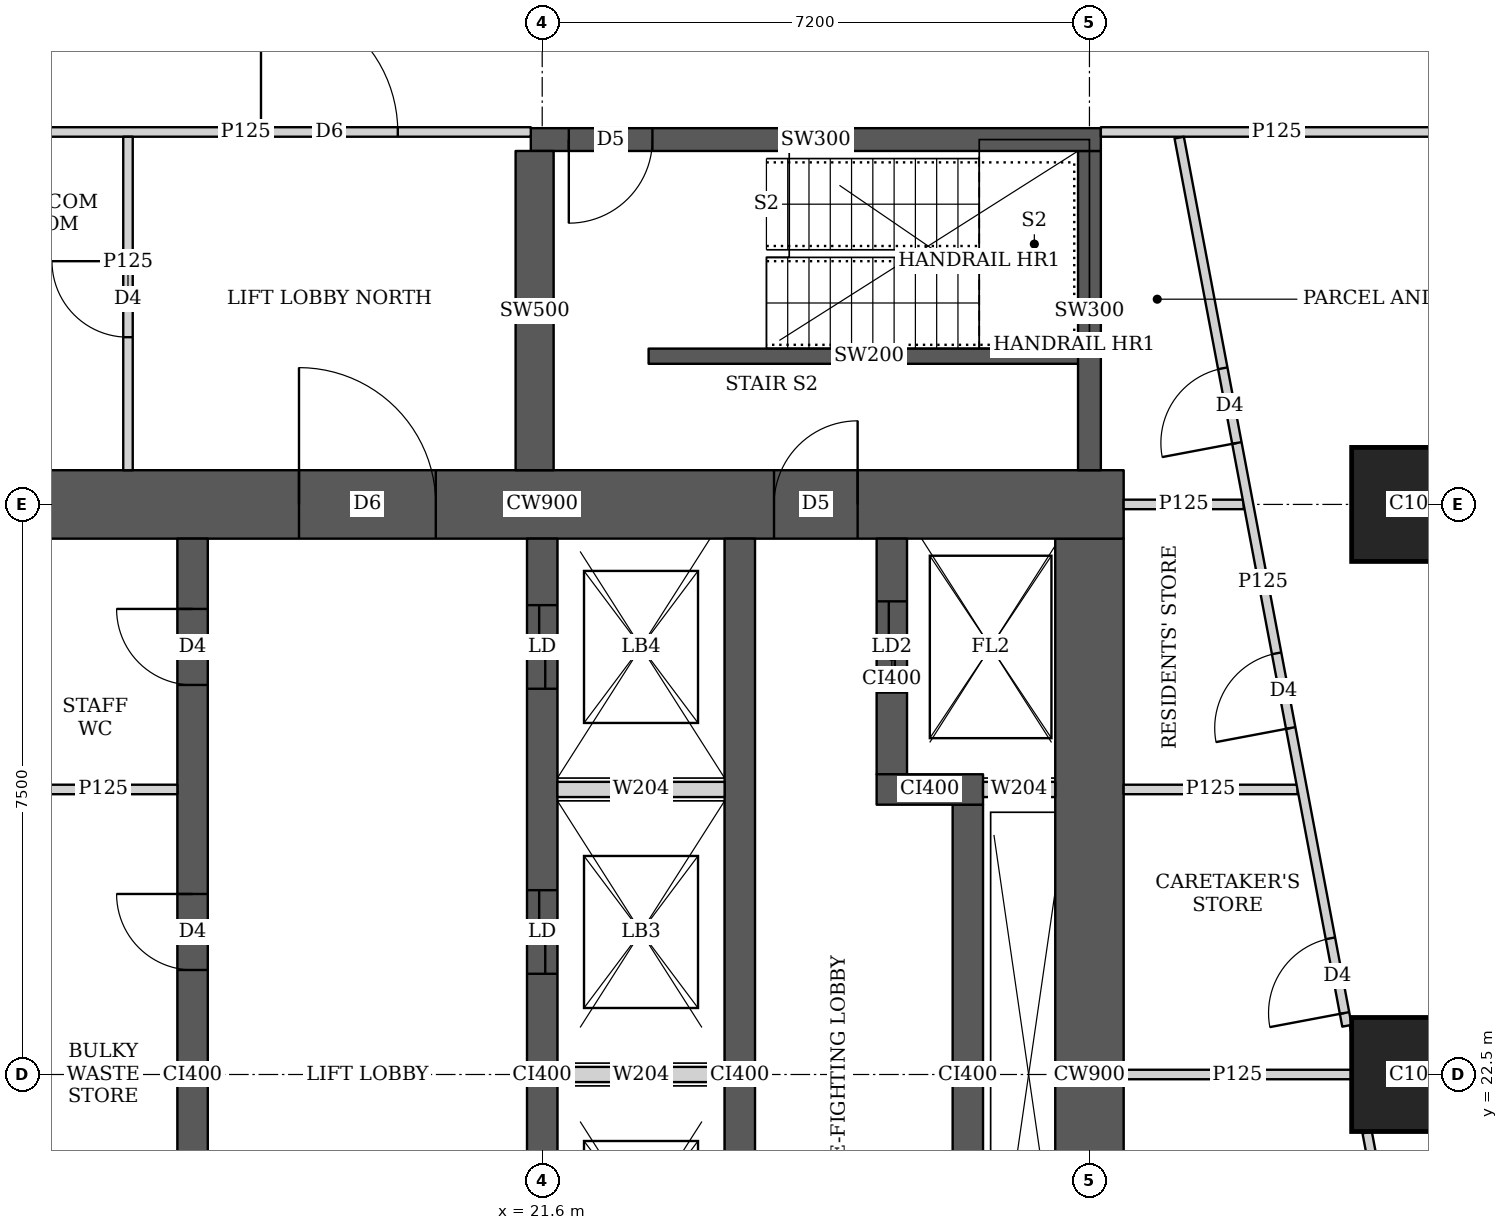
"""IFC4 building model, lengths in metres.
Left out: names, types, materials, properties, quantities, classifications, styles, units other than length and angle.
Written with IfcOpenShell. Run it as: python <this file> out.ifc"""

import sys

from ifc_helpers import new_model, si_unit, direction, frame, frame_2d, origin, origin_2d, place, context, subcontext, project, spatial, rectangle, extrude, element, fill, save


model = new_model("IFC4")
c1 = context("Model", 3, precision=1e-05, world=origin(), true_north=direction((0.0, 1.0)))
c2 = subcontext(c1, "Body", "Model", "MODEL_VIEW")
j1 = project(units=[si_unit("LENGTHUNIT", "METRE"), si_unit("PLANEANGLEUNIT", "RADIAN")], contexts=[c1])
p1 = place(None, origin())
s1 = spatial("IfcSite", under=j1, at=p1, CompositionType="ELEMENT")
p2 = place(p1, origin())
s2 = spatial("IfcBuilding", under=s1, at=p2, CompositionType="ELEMENT")
p3 = place(p2, frame((0.0, 0.0, 147.05)))
s3 = spatial("IfcBuildingStorey", under=s2, at=p3, CompositionType="ELEMENT", Elevation=147.05)
for number, where, z_axis, x_axis in (
    (1, (33.0, 22.5, 0.0), (0.0, 0.0, 1.0), (1.0, 0.0, 0.0)),
    (2, (33.0, 30.0, 0.0), (0.0, 0.0, 1.0), (1.0, 0.0, 0.0)),
):
    element("IfcColumn", number, at=place(p3, frame(where, z_axis=z_axis, x_axis=x_axis)), inside=s3, PredefinedType="COLUMN", context=c2, shape_type="SweptSolid", body=[
        extrude(rectangle(XDim=1.5, YDim=1.5, at=origin_2d()), origin(), (0.0, 0.0, 1.0), 3.75),
    ])
p4 = place(p3, frame((13.95, 30.0, 0.0), z_axis=(0.0, 0.0, 1.0), x_axis=(1.0, 0.0, 0.0)))
e3 = element("IfcWall", 3, at=p4, inside=s3, PredefinedType="SHEAR", context=c2, shape_type="SweptSolid", body=[
    extrude(rectangle(XDim=15.3, YDim=0.9, at=frame_2d((7.65, 0.0))), origin(), (0.0, 0.0, 1.0), 3.75),
])
p5 = place(p4, frame((4.45, 0.0, 0.0)))
e4 = element("IfcOpeningElement", 4, at=p5, cuts=e3, PredefinedType="OPENING", context=c2, shape_type="SweptSolid", body=[
    extrude(rectangle(XDim=1.8, YDim=2.1, at=frame_2d((0.9, 1.05))), frame((0.0, 0.46, 0.0), z_axis=(0.0, -1.0, 0.0), x_axis=(1.0, 0.0, 0.0)), (0.0, 0.0, 1.0), 0.92),
])
p6 = place(p4, frame((10.7, 0.0, 0.0)))
e5 = element("IfcOpeningElement", 5, at=p6, cuts=e3, PredefinedType="OPENING", context=c2, shape_type="SweptSolid", body=[
    extrude(rectangle(XDim=1.1, YDim=2.1, at=frame_2d((0.55, 1.05))), frame((0.0, 0.46, 0.0), z_axis=(0.0, -1.0, 0.0), x_axis=(1.0, 0.0, 0.0)), (0.0, 0.0, 1.0), 0.92),
])
p7 = place(p3, frame((28.8, 15.45, 0.0), z_axis=(0.0, 0.0, 1.0), x_axis=(0.0, 1.0, 0.0)))
e6 = element("IfcWall", 6, at=p7, inside=s3, PredefinedType="SHEAR", context=c2, shape_type="SweptSolid", body=[
    extrude(rectangle(XDim=14.1, YDim=0.9, at=frame_2d((7.05, 0.0))), origin(), (0.0, 0.0, 1.0), 3.75),
])
p8 = place(p3, frame((17.0, 15.45, 0.0), z_axis=(0.0, 0.0, 1.0), x_axis=(0.0, 1.0, 0.0)))
e7 = element("IfcWall", 7, at=p8, inside=s3, PredefinedType="SHEAR", context=c2, shape_type="SweptSolid", body=[
    extrude(rectangle(XDim=14.1, YDim=0.4, at=frame_2d((7.05, 0.0))), origin(), (0.0, 0.0, 1.0), 3.75),
])
p9 = place(p8, frame((0.925, 0.0, 0.0)))
e8 = element("IfcOpeningElement", 8, at=p9, cuts=e7, PredefinedType="OPENING", context=c2, shape_type="SweptSolid", body=[
    extrude(rectangle(XDim=1.0, YDim=2.1, at=frame_2d((0.5, 1.05))), frame((0.0, 0.21, 0.0), z_axis=(0.0, -1.0, 0.0), x_axis=(1.0, 0.0, 0.0)), (0.0, 0.0, 1.0), 0.42),
])
p10 = place(p8, frame((4.675, 0.0, 0.0)))
e9 = element("IfcOpeningElement", 9, at=p10, cuts=e7, PredefinedType="OPENING", context=c2, shape_type="SweptSolid", body=[
    extrude(rectangle(XDim=1.0, YDim=2.1, at=frame_2d((0.5, 1.05))), frame((0.0, 0.21, 0.0), z_axis=(0.0, -1.0, 0.0), x_axis=(1.0, 0.0, 0.0)), (0.0, 0.0, 1.0), 0.42),
])
p11 = place(p8, frame((8.425, 0.0, 0.0)))
e10 = element("IfcOpeningElement", 10, at=p11, cuts=e7, PredefinedType="OPENING", context=c2, shape_type="SweptSolid", body=[
    extrude(rectangle(XDim=1.0, YDim=2.1, at=frame_2d((0.5, 1.05))), frame((0.0, 0.21, 0.0), z_axis=(0.0, -1.0, 0.0), x_axis=(1.0, 0.0, 0.0)), (0.0, 0.0, 1.0), 0.42),
])
p12 = place(p8, frame((12.175, 0.0, 0.0)))
e11 = element("IfcOpeningElement", 11, at=p12, cuts=e7, PredefinedType="OPENING", context=c2, shape_type="SweptSolid", body=[
    extrude(rectangle(XDim=1.0, YDim=2.1, at=frame_2d((0.5, 1.05))), frame((0.0, 0.21, 0.0), z_axis=(0.0, -1.0, 0.0), x_axis=(1.0, 0.0, 0.0)), (0.0, 0.0, 1.0), 0.42),
])
p13 = place(p3, frame((21.6, 15.45, 0.0), z_axis=(0.0, 0.0, 1.0), x_axis=(0.0, 1.0, 0.0)))
e12 = element("IfcWall", 12, at=p13, inside=s3, PredefinedType="SHEAR", context=c2, shape_type="SweptSolid", body=[
    extrude(rectangle(XDim=14.1, YDim=0.4, at=frame_2d((7.05, 0.0))), origin(), (0.0, 0.0, 1.0), 3.75),
])
p14 = place(p13, frame((0.875, 0.0, 0.0)))
e13 = element("IfcOpeningElement", 13, at=p14, cuts=e12, PredefinedType="OPENING", context=c2, shape_type="SweptSolid", body=[
    extrude(rectangle(XDim=1.1, YDim=2.1, at=frame_2d((0.55, 1.05))), frame((0.0, 0.21, 0.0), z_axis=(0.0, -1.0, 0.0), x_axis=(1.0, 0.0, 0.0)), (0.0, 0.0, 1.0), 0.42),
])
p15 = place(p13, frame((4.625, 0.0, 0.0)))
e14 = element("IfcOpeningElement", 14, at=p15, cuts=e12, PredefinedType="OPENING", context=c2, shape_type="SweptSolid", body=[
    extrude(rectangle(XDim=1.1, YDim=2.1, at=frame_2d((0.55, 1.05))), frame((0.0, 0.21, 0.0), z_axis=(0.0, -1.0, 0.0), x_axis=(1.0, 0.0, 0.0)), (0.0, 0.0, 1.0), 0.42),
])
p16 = place(p13, frame((8.375, 0.0, 0.0)))
e15 = element("IfcOpeningElement", 15, at=p16, cuts=e12, PredefinedType="OPENING", context=c2, shape_type="SweptSolid", body=[
    extrude(rectangle(XDim=1.1, YDim=2.1, at=frame_2d((0.55, 1.05))), frame((0.0, 0.21, 0.0), z_axis=(0.0, -1.0, 0.0), x_axis=(1.0, 0.0, 0.0)), (0.0, 0.0, 1.0), 0.42),
])
p17 = place(p13, frame((12.125, 0.0, 0.0)))
e16 = element("IfcOpeningElement", 16, at=p17, cuts=e12, PredefinedType="OPENING", context=c2, shape_type="SweptSolid", body=[
    extrude(rectangle(XDim=1.1, YDim=2.1, at=frame_2d((0.55, 1.05))), frame((0.0, 0.21, 0.0), z_axis=(0.0, -1.0, 0.0), x_axis=(1.0, 0.0, 0.0)), (0.0, 0.0, 1.0), 0.42),
])
p18 = place(p3, frame((24.2, 15.45, 0.0), z_axis=(0.0, 0.0, 1.0), x_axis=(0.0, 1.0, 0.0)))
e17 = element("IfcWall", 17, at=p18, inside=s3, PredefinedType="SHEAR", context=c2, shape_type="SweptSolid", body=[
    extrude(rectangle(XDim=14.1, YDim=0.4, at=frame_2d((7.05, 0.0))), origin(), (0.0, 0.0, 1.0), 3.75),
])
p19 = place(p3, frame((27.2, 18.95, 0.0), z_axis=(0.0, 0.0, 1.0), x_axis=(0.0, 1.0, 0.0)))
e18 = element("IfcWall", 18, at=p19, inside=s3, PredefinedType="SHEAR", context=c2, shape_type="SweptSolid", body=[
    extrude(rectangle(XDim=7.1, YDim=0.4, at=frame_2d((3.55, 0.0))), origin(), (0.0, 0.0, 1.0), 3.75),
])
p20 = place(p3, frame((26.0, 26.25, 0.0), z_axis=(0.0, 0.0, 1.0), x_axis=(1.0, 0.0, 0.0)))
e19 = element("IfcWall", 19, at=p20, inside=s3, PredefinedType="SHEAR", context=c2, shape_type="SweptSolid", body=[
    extrude(rectangle(XDim=1.4, YDim=0.4, at=frame_2d((0.7, 0.0))), origin(), (0.0, 0.0, 1.0), 3.75),
])
p21 = place(p3, frame((26.2, 26.45, 0.0), z_axis=(0.0, 0.0, 1.0), x_axis=(0.0, 1.0, 0.0)))
e20 = element("IfcWall", 20, at=p21, inside=s3, PredefinedType="SHEAR", context=c2, shape_type="SweptSolid", body=[
    extrude(rectangle(XDim=3.1, YDim=0.4, at=frame_2d((1.55, 0.0))), origin(), (0.0, 0.0, 1.0), 3.75),
])
p22 = place(p21, frame((1.075, 0.0, 0.0)))
e21 = element("IfcOpeningElement", 21, at=p22, cuts=e20, PredefinedType="OPENING", context=c2, shape_type="SweptSolid", body=[
    extrude(rectangle(XDim=1.2, YDim=2.1, at=frame_2d((0.6, 1.05))), frame((0.0, 0.21, 0.0), z_axis=(0.0, -1.0, 0.0), x_axis=(1.0, 0.0, 0.0)), (0.0, 0.0, 1.0), 0.42),
])
p23 = place(p3, frame((21.45, 34.8, 0.0), z_axis=(0.0, 0.0, 1.0), x_axis=(1.0, 0.0, 0.0)))
e22 = element("IfcWall", 22, at=p23, inside=s3, PredefinedType="SHEAR", context=c2, shape_type="SweptSolid", body=[
    extrude(rectangle(XDim=7.5, YDim=0.3, at=frame_2d((3.75, 0.0))), origin(), (0.0, 0.0, 1.0), 3.75),
])
p24 = place(p23, frame((0.5, 0.0, 0.0)))
e23 = element("IfcOpeningElement", 23, at=p24, cuts=e22, PredefinedType="OPENING", context=c2, shape_type="SweptSolid", body=[
    extrude(rectangle(XDim=1.1, YDim=2.1, at=frame_2d((0.55, 1.05))), frame((0.0, 0.16, 0.0), z_axis=(0.0, -1.0, 0.0), x_axis=(1.0, 0.0, 0.0)), (0.0, 0.0, 1.0), 0.32),
])
p25 = place(p3, frame((21.5, 30.45, 0.0), z_axis=(0.0, 0.0, 1.0), x_axis=(0.0, 1.0, 0.0)))
e24 = element("IfcWall", 24, at=p25, inside=s3, PredefinedType="SHEAR", context=c2, shape_type="SweptSolid", body=[
    extrude(rectangle(XDim=4.2, YDim=0.5, at=frame_2d((2.1, 0.0))), origin(), (0.0, 0.0, 1.0), 3.75),
])
p26 = place(p3, frame((28.8, 30.45, 0.0), z_axis=(0.0, 0.0, 1.0), x_axis=(0.0, 1.0, 0.0)))
e25 = element("IfcWall", 25, at=p26, inside=s3, PredefinedType="SHEAR", context=c2, shape_type="SweptSolid", body=[
    extrude(rectangle(XDim=4.2, YDim=0.3, at=frame_2d((2.1, 0.0))), origin(), (0.0, 0.0, 1.0), 3.75),
])
p27 = place(p3, frame((13.95, 34.9, 0.0), z_axis=(0.0, 0.0, 1.0), x_axis=(1.0, 0.0, 0.0)))
e26 = element("IfcWall", 26, at=p27, inside=s3, PredefinedType="PARTITIONING", context=c2, shape_type="SweptSolid", body=[
    extrude(rectangle(XDim=7.5, YDim=0.125, at=frame_2d((3.75, 0.0))), origin(), (0.0, 0.0, 1.0), 3.5),
])
p28 = place(p27, frame((3.95, 0.0, 0.0)))
e27 = element("IfcOpeningElement", 27, at=p28, cuts=e26, PredefinedType="OPENING", context=c2, shape_type="SweptSolid", body=[
    extrude(rectangle(XDim=1.8, YDim=2.1, at=frame_2d((0.9, 1.05))), frame((0.0, 0.073, 0.0), z_axis=(0.0, -1.0, 0.0), x_axis=(1.0, 0.0, 0.0)), (0.0, 0.0, 1.0), 0.145),
])
p29 = place(p3, frame((16.15, 30.45, 0.0), z_axis=(0.0, 0.0, 1.0), x_axis=(0.0, 1.0, 0.0)))
e28 = element("IfcWall", 28, at=p29, inside=s3, PredefinedType="PARTITIONING", context=c2, shape_type="SweptSolid", body=[
    extrude(rectangle(XDim=4.387, YDim=0.125, at=frame_2d((2.193, 0.0))), origin(), (0.0, 0.0, 1.0), 3.5),
])
p30 = place(p29, frame((1.75, 0.0, 0.0)))
e29 = element("IfcOpeningElement", 29, at=p30, cuts=e28, PredefinedType="OPENING", context=c2, shape_type="SweptSolid", body=[
    extrude(rectangle(XDim=1.0, YDim=2.1, at=frame_2d((0.5, 1.05))), frame((0.0, 0.073, 0.0), z_axis=(0.0, -1.0, 0.0), x_axis=(1.0, 0.0, 0.0)), (0.0, 0.0, 1.0), 0.145),
])
p31 = place(p3, frame((28.95, 34.9, 0.0), z_axis=(0.0, 0.0, 1.0), x_axis=(1.0, 0.0, 0.0)))
e30 = element("IfcWall", 30, at=p31, inside=s3, PredefinedType="PARTITIONING", context=c2, shape_type="SweptSolid", body=[
    extrude(rectangle(XDim=4.63, YDim=0.125, at=frame_2d((2.315, 0.0))), origin(), (0.0, 0.0, 1.0), 3.5),
])
p32 = place(p3, frame((34.638, 10.174, 0.0), z_axis=(0.0, 0.0, 1.0), x_axis=(-0.185583626094, 0.982628473903, 0.0)))
e31 = element("IfcWall", 31, at=p32, inside=s3, PredefinedType="PARTITIONING", context=c2, shape_type="SweptSolid", body=[
    extrude(rectangle(XDim=11.767, YDim=0.125, at=frame_2d((5.884, 0.0))), origin(), (0.0, 0.0, 1.0), 3.5),
])
p33 = place(p32, frame((0.697, 0.0, 0.0)))
e32 = element("IfcOpeningElement", 32, at=p33, cuts=e31, PredefinedType="OPENING", context=c2, shape_type="SweptSolid", body=[
    extrude(rectangle(XDim=1.0, YDim=2.1, at=frame_2d((0.5, 1.05))), frame((0.0, 0.073, 0.0), z_axis=(0.0, -1.0, 0.0), x_axis=(1.0, 0.0, 0.0)), (0.0, 0.0, 1.0), 0.145),
])
p34 = place(p32, frame((5.734, 0.0, 0.0)))
e33 = element("IfcOpeningElement", 33, at=p34, cuts=e31, PredefinedType="OPENING", context=c2, shape_type="SweptSolid", body=[
    extrude(rectangle(XDim=1.0, YDim=2.1, at=frame_2d((0.5, 1.05))), frame((0.0, 0.073, 0.0), z_axis=(0.0, -1.0, 0.0), x_axis=(1.0, 0.0, 0.0)), (0.0, 0.0, 1.0), 0.145),
])
p35 = place(p3, frame((32.188, 23.141, 0.0), z_axis=(0.0, 0.0, 1.0), x_axis=(-0.185598625075, 0.98262564101, 0.0)))
e34 = element("IfcWall", 34, at=p35, inside=s3, PredefinedType="PARTITIONING", context=c2, shape_type="SweptSolid", body=[
    extrude(rectangle(XDim=11.891, YDim=0.125, at=frame_2d((5.946, 0.0))), origin(), (0.0, 0.0, 1.0), 3.5),
])
p36 = place(p35, frame((0.171, 0.0, 0.0)))
e35 = element("IfcOpeningElement", 35, at=p36, cuts=e34, PredefinedType="OPENING", context=c2, shape_type="SweptSolid", body=[
    extrude(rectangle(XDim=1.0, YDim=2.1, at=frame_2d((0.5, 1.05))), frame((0.0, 0.073, 0.0), z_axis=(0.0, -1.0, 0.0), x_axis=(1.0, 0.0, 0.0)), (0.0, 0.0, 1.0), 0.145),
])
p37 = place(p35, frame((3.987, 0.0, 0.0)))
e36 = element("IfcOpeningElement", 36, at=p37, cuts=e34, PredefinedType="OPENING", context=c2, shape_type="SweptSolid", body=[
    extrude(rectangle(XDim=1.0, YDim=2.1, at=frame_2d((0.5, 1.05))), frame((0.0, 0.073, 0.0), z_axis=(0.0, -1.0, 0.0), x_axis=(1.0, 0.0, 0.0)), (0.0, 0.0, 1.0), 0.145),
])
p38 = place(p35, frame((7.803, 0.0, 0.0)))
e37 = element("IfcOpeningElement", 37, at=p38, cuts=e34, PredefinedType="OPENING", context=c2, shape_type="SweptSolid", body=[
    extrude(rectangle(XDim=1.0, YDim=2.1, at=frame_2d((0.5, 1.05))), frame((0.0, 0.073, 0.0), z_axis=(0.0, -1.0, 0.0), x_axis=(1.0, 0.0, 0.0)), (0.0, 0.0, 1.0), 0.145),
])
p39 = place(p3, frame((29.25, 22.5, 0.0), z_axis=(0.0, 0.0, 1.0), x_axis=(1.0, 0.0, 0.0)))
e38 = element("IfcWall", 38, at=p39, inside=s3, PredefinedType="PARTITIONING", context=c2, shape_type="SweptSolid", body=[
    extrude(rectangle(XDim=2.996, YDim=0.125, at=frame_2d((1.498, 0.0))), origin(), (0.0, 0.0, 1.0), 3.5),
])
p40 = place(p3, frame((29.25, 26.25, 0.0), z_axis=(0.0, 0.0, 1.0), x_axis=(1.0, 0.0, 0.0)))
e39 = element("IfcWall", 39, at=p40, inside=s3, PredefinedType="PARTITIONING", context=c2, shape_type="SweptSolid", body=[
    extrude(rectangle(XDim=2.288, YDim=0.125, at=frame_2d((1.144, 0.0))), origin(), (0.0, 0.0, 1.0), 3.5),
])
p41 = place(p3, frame((29.25, 30.0, 0.0), z_axis=(0.0, 0.0, 1.0), x_axis=(1.0, 0.0, 0.0)))
e40 = element("IfcWall", 40, at=p41, inside=s3, PredefinedType="PARTITIONING", context=c2, shape_type="SweptSolid", body=[
    extrude(rectangle(XDim=1.579, YDim=0.125, at=frame_2d((0.79, 0.0))), origin(), (0.0, 0.0, 1.0), 3.5),
])
p42 = place(p3, frame((14.85, 26.25, 0.0), z_axis=(0.0, 0.0, 1.0), x_axis=(1.0, 0.0, 0.0)))
e41 = element("IfcWall", 41, at=p42, inside=s3, PredefinedType="PARTITIONING", context=c2, shape_type="SweptSolid", body=[
    extrude(rectangle(XDim=1.95, YDim=0.125, at=frame_2d((0.975, 0.0))), origin(), (0.0, 0.0, 1.0), 3.5),
])
p43 = place(p3, frame((23.0, 31.95, 0.0), z_axis=(0.0, 0.0, 1.0), x_axis=(1.0, 0.0, 0.0)))
e42 = element("IfcWall", 42, at=p43, inside=s3, PredefinedType="SHEAR", context=c2, shape_type="SweptSolid", body=[
    extrude(rectangle(XDim=5.8, YDim=0.2, at=frame_2d((2.9, 0.0))), origin(), (0.0, 0.0, 1.0), 3.75),
])
for number, where, z_axis, x_axis in (
    (43, (21.8, 22.5, 0.0), (0.0, 0.0, 1.0), (1.0, 0.0, 0.0)),
    (44, (21.8, 26.25, 0.0), (0.0, 0.0, 1.0), (1.0, 0.0, 0.0)),
):
    element("IfcWall", number, at=place(p3, frame(where, z_axis=z_axis, x_axis=x_axis)), inside=s3, PredefinedType="SOLIDWALL", context=c2, shape_type="SweptSolid", body=[
        extrude(rectangle(XDim=2.2, YDim=0.2, at=frame_2d((1.1, 0.0))), origin(), (0.0, 0.0, 1.0), 3.5),
    ])
p44 = place(p3, frame((27.4, 26.25, 0.0), z_axis=(0.0, 0.0, 1.0), x_axis=(1.0, 0.0, 0.0)))
e45 = element("IfcWall", 45, at=p44, inside=s3, PredefinedType="SOLIDWALL", context=c2, shape_type="SweptSolid", body=[
    extrude(rectangle(XDim=0.95, YDim=0.2, at=frame_2d((0.475, 0.0))), origin(), (0.0, 0.0, 1.0), 3.5),
])
p45 = place(p30, origin())
e46 = element("IfcDoor", 46, at=p45, inside=s3, OperationType="SINGLE_SWING_RIGHT", PredefinedType="DOOR", context=c2, shape_type="SweptSolid", body=[
    extrude(rectangle(XDim=1.0, YDim=2.1, at=frame_2d((0.5, 1.05))), frame((0.0, 0.025, 0.0), z_axis=(0.0, -1.0, 0.0), x_axis=(1.0, 0.0, 0.0)), (0.0, 0.0, 1.0), 0.05),
])
fill(e29, e46)
p46 = place(p28, origin())
e47 = element("IfcDoor", 47, at=p46, inside=s3, OperationType="DOUBLE_DOOR_SINGLE_SWING", PredefinedType="DOOR", context=c2, shape_type="SweptSolid", body=[
    extrude(rectangle(XDim=1.8, YDim=2.1, at=frame_2d((0.9, 1.05))), frame((0.0, 0.025, 0.0), z_axis=(0.0, -1.0, 0.0), x_axis=(1.0, 0.0, 0.0)), (0.0, 0.0, 1.0), 0.05),
])
fill(e27, e47)
p47 = place(p36, origin())
e48 = element("IfcDoor", 48, at=p47, inside=s3, OperationType="SINGLE_SWING_LEFT", PredefinedType="DOOR", context=c2, shape_type="SweptSolid", body=[
    extrude(rectangle(XDim=1.0, YDim=2.1, at=frame_2d((0.5, 1.05))), frame((0.0, 0.025, 0.0), z_axis=(0.0, -1.0, 0.0), x_axis=(1.0, 0.0, 0.0)), (0.0, 0.0, 1.0), 0.05),
])
fill(e35, e48)
p48 = place(p37, origin())
e49 = element("IfcDoor", 49, at=p48, inside=s3, OperationType="SINGLE_SWING_LEFT", PredefinedType="DOOR", context=c2, shape_type="SweptSolid", body=[
    extrude(rectangle(XDim=1.0, YDim=2.1, at=frame_2d((0.5, 1.05))), frame((0.0, 0.025, 0.0), z_axis=(0.0, -1.0, 0.0), x_axis=(1.0, 0.0, 0.0)), (0.0, 0.0, 1.0), 0.05),
])
fill(e36, e49)
p49 = place(p38, origin())
e50 = element("IfcDoor", 50, at=p49, inside=s3, OperationType="SINGLE_SWING_LEFT", PredefinedType="DOOR", context=c2, shape_type="SweptSolid", body=[
    extrude(rectangle(XDim=1.0, YDim=2.1, at=frame_2d((0.5, 1.05))), frame((0.0, 0.025, 0.0), z_axis=(0.0, -1.0, 0.0), x_axis=(1.0, 0.0, 0.0)), (0.0, 0.0, 1.0), 0.05),
])
fill(e37, e50)
p50 = place(p11, origin())
e51 = element("IfcDoor", 51, at=p50, inside=s3, OperationType="SINGLE_SWING_RIGHT", PredefinedType="DOOR", context=c2, shape_type="SweptSolid", body=[
    extrude(rectangle(XDim=1.0, YDim=2.1, at=frame_2d((0.5, 1.05))), frame((0.0, 0.025, 0.0), z_axis=(0.0, -1.0, 0.0), x_axis=(1.0, 0.0, 0.0)), (0.0, 0.0, 1.0), 0.05),
])
fill(e10, e51)
p51 = place(p12, origin())
e52 = element("IfcDoor", 52, at=p51, inside=s3, OperationType="SINGLE_SWING_RIGHT", PredefinedType="DOOR", context=c2, shape_type="SweptSolid", body=[
    extrude(rectangle(XDim=1.0, YDim=2.1, at=frame_2d((0.5, 1.05))), frame((0.0, 0.025, 0.0), z_axis=(0.0, -1.0, 0.0), x_axis=(1.0, 0.0, 0.0)), (0.0, 0.0, 1.0), 0.05),
])
fill(e11, e52)
p52 = place(p5, origin())
e53 = element("IfcDoor", 53, at=p52, inside=s3, OperationType="DOUBLE_DOOR_SINGLE_SWING", PredefinedType="DOOR", context=c2, shape_type="SweptSolid", body=[
    extrude(rectangle(XDim=1.8, YDim=2.1, at=frame_2d((0.9, 1.05))), frame((0.0, 0.025, 0.0), z_axis=(0.0, -1.0, 0.0), x_axis=(1.0, 0.0, 0.0)), (0.0, 0.0, 1.0), 0.05),
])
fill(e4, e53)
p53 = place(p6, origin())
e54 = element("IfcDoor", 54, at=p53, inside=s3, OperationType="SINGLE_SWING_RIGHT", PredefinedType="DOOR", context=c2, shape_type="SweptSolid", body=[
    extrude(rectangle(XDim=1.1, YDim=2.1, at=frame_2d((0.55, 1.05))), frame((0.0, 0.025, 0.0), z_axis=(0.0, -1.0, 0.0), x_axis=(1.0, 0.0, 0.0)), (0.0, 0.0, 1.0), 0.05),
])
fill(e5, e54)
p54 = place(p22, origin())
e55 = element("IfcDoor", 55, at=p54, inside=s3, OperationType="DOUBLE_DOOR_SLIDING", PredefinedType="DOOR", context=c2, shape_type="SweptSolid", body=[
    extrude(rectangle(XDim=1.2, YDim=2.1, at=frame_2d((0.6, 1.05))), frame((0.0, 0.025, 0.0), z_axis=(0.0, -1.0, 0.0), x_axis=(1.0, 0.0, 0.0)), (0.0, 0.0, 1.0), 0.05),
])
fill(e21, e55)
p55 = place(p16, origin())
e56 = element("IfcDoor", 56, at=p55, inside=s3, OperationType="DOUBLE_DOOR_SLIDING", PredefinedType="DOOR", context=c2, shape_type="SweptSolid", body=[
    extrude(rectangle(XDim=1.1, YDim=2.1, at=frame_2d((0.55, 1.05))), frame((0.0, 0.025, 0.0), z_axis=(0.0, -1.0, 0.0), x_axis=(1.0, 0.0, 0.0)), (0.0, 0.0, 1.0), 0.05),
])
fill(e15, e56)
p56 = place(p17, origin())
e57 = element("IfcDoor", 57, at=p56, inside=s3, OperationType="DOUBLE_DOOR_SLIDING", PredefinedType="DOOR", context=c2, shape_type="SweptSolid", body=[
    extrude(rectangle(XDim=1.1, YDim=2.1, at=frame_2d((0.55, 1.05))), frame((0.0, 0.025, 0.0), z_axis=(0.0, -1.0, 0.0), x_axis=(1.0, 0.0, 0.0)), (0.0, 0.0, 1.0), 0.05),
])
fill(e16, e57)
p57 = place(p24, origin())
e58 = element("IfcDoor", 58, at=p57, inside=s3, OperationType="SINGLE_SWING_RIGHT", PredefinedType="DOOR", context=c2, shape_type="SweptSolid", body=[
    extrude(rectangle(XDim=1.1, YDim=2.1, at=frame_2d((0.55, 1.05))), frame((0.0, 0.025, 0.0), z_axis=(0.0, -1.0, 0.0), x_axis=(1.0, 0.0, 0.0)), (0.0, 0.0, 1.0), 0.05),
])
fill(e23, e58)
save(model, sys.argv[1])
